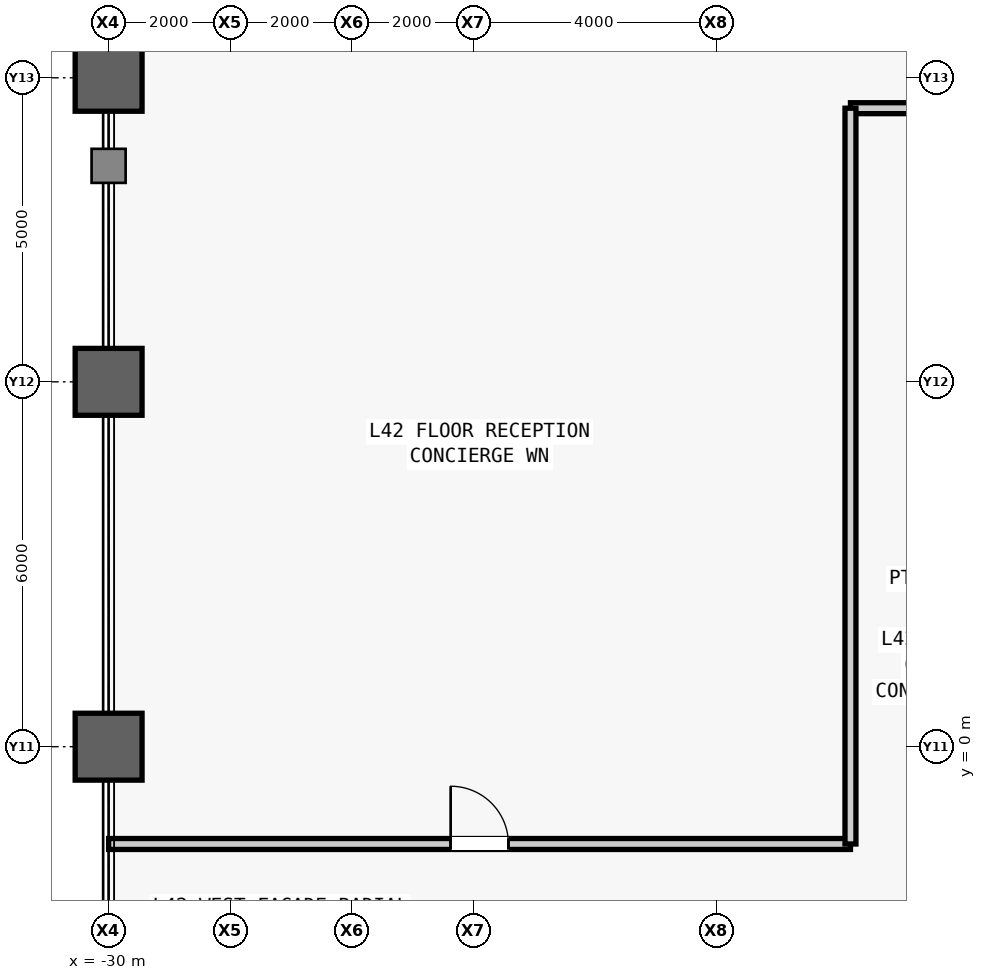
"""IFC4 building model, lengths in metres.
Left out: names, types, materials, properties, quantities, classifications, styles, units other than length and angle.
Written with IfcOpenShell. Run it as: python <this file> out.ifc"""

import sys

from ifc_helpers import new_model, si_unit, direction, frame, frame_2d, origin, origin_2d, place, context, subcontext, project, spatial, rectangle, hollow_rectangle, extrude, source, transform, mapped, element, fill, save


model = new_model("IFC4")
c1 = context("Model", 3, precision=1e-05, world=origin(), true_north=direction((0.0, 1.0)))
c2 = subcontext(c1, "Body", "Model", "MODEL_VIEW")
j1 = project(units=[si_unit("LENGTHUNIT", "METRE"), si_unit("PLANEANGLEUNIT", "RADIAN")], contexts=[c1])
p1 = place(None, origin())
s1 = spatial("IfcSite", under=j1, at=p1, CompositionType="ELEMENT")
p2 = place(p1, origin())
s2 = spatial("IfcBuilding", under=s1, at=p2, CompositionType="ELEMENT")
p3 = place(p2, frame((0.0, 0.0, 183.1)))
s3 = spatial("IfcBuildingStorey", under=s2, at=p3, CompositionType="ELEMENT", Elevation=183.1)
m1 = source(origin(), c2, "Body", "SweptSolid", [
    extrude(hollow_rectangle(XDim=1.1, YDim=1.1, WallThickness=0.06, at=origin_2d()), origin(), (0.0, 0.0, 1.0), 4.0),
])
for number, where, z_axis, x_axis in (
    (1, (-30.0, 0.0, 0.0), (0.0, 0.0, 1.0), (1.0, 0.0, 0.0)),
    (2, (-30.0, 6.0, 0.0), (0.0, 0.0, 1.0), (1.0, 0.0, 0.0)),
    (3, (-30.0, 11.0, 0.0), (0.0, 0.0, 1.0), (1.0, 0.0, 0.0)),
):
    element("IfcColumn", number, at=place(p3, frame(where, z_axis=z_axis, x_axis=x_axis)), inside=s3, PredefinedType="COLUMN", context=c2, shape_type="MappedRepresentation", body=[
        mapped(m1, transform((0.0, 0.0, 0.0), scale=1.0)),
    ])
m2 = source(origin(), c2, "Body", "SweptSolid", [
    extrude(rectangle(XDim=2.45, YDim=0.18, at=frame_2d((1.225, 0.0))), origin(), (0.0, 0.0, 1.0), 3.78),
])
p4 = place(p3, frame((-17.8, 10.5, 0.0), z_axis=(0.0, 0.0, 1.0), x_axis=(1.0, 0.0, 0.0)))
e4 = element("IfcWall", 4, at=p4, inside=s3, PredefinedType="PARTITIONING", context=c2, shape_type="MappedRepresentation", body=[
    mapped(m2, transform((0.0, 0.0, 0.0), scale=1.0)),
])
m3 = source(origin(), c2, "Body", "SweptSolid", [
    extrude(rectangle(XDim=12.2, YDim=0.18, at=frame_2d((6.1, 0.0))), origin(), (0.0, 0.0, 1.0), 3.78),
])
p5 = place(p3, frame((-30.0, -1.6, 0.0), z_axis=(0.0, 0.0, 1.0), x_axis=(1.0, 0.0, 0.0)))
e5 = element("IfcWall", 5, at=p5, inside=s3, PredefinedType="PARTITIONING", context=c2, shape_type="MappedRepresentation", body=[
    mapped(m3, transform((0.0, 0.0, 0.0), scale=1.0)),
])
m4 = source(origin(), c2, "Body", "SweptSolid", [
    extrude(rectangle(XDim=0.95, YDim=2.15, at=frame_2d((0.475, 1.075))), frame((0.0, 0.1, 0.0), z_axis=(0.0, -1.0, 0.0), x_axis=(1.0, 0.0, 0.0)), (0.0, 0.0, 1.0), 0.2),
])
p6 = place(p5, frame((5.625, 0.0, 0.0)))
e6 = element("IfcOpeningElement", 6, at=p6, cuts=e5, PredefinedType="OPENING", context=c2, shape_type="MappedRepresentation", body=[
    mapped(m4, transform((0.0, 0.0, 0.0), scale=1.0)),
])
m5 = source(origin(), c2, "Body", "SweptSolid", [
    extrude(rectangle(XDim=12.1, YDim=0.18, at=frame_2d((6.05, 0.0))), origin(), (0.0, 0.0, 1.0), 3.78),
])
p7 = place(p3, frame((-17.8, -1.6, 0.0), z_axis=(0.0, 0.0, 1.0), x_axis=(0.0, 1.0, 0.0)))
e7 = element("IfcWall", 7, at=p7, inside=s3, PredefinedType="PARTITIONING", context=c2, shape_type="MappedRepresentation", body=[
    mapped(m5, transform((0.0, 0.0, 0.0), scale=1.0)),
])
m6 = source(origin(), c2, "Body", "SweptSolid", [
    extrude(rectangle(XDim=0.95, YDim=2.15, at=frame_2d((0.475, 1.075))), frame((0.0, 0.025, 0.0), z_axis=(0.0, -1.0, 0.0), x_axis=(1.0, 0.0, 0.0)), (0.0, 0.0, 1.0), 0.05),
])
p8 = place(p6, origin())
e8 = element("IfcDoor", 8, at=p8, inside=s3, OperationType="SINGLE_SWING_LEFT", PredefinedType="DOOR", context=c2, shape_type="MappedRepresentation", body=[
    mapped(m6, transform((0.0, 0.0, 0.0), scale=1.0)),
])
fill(e6, e8)
save(model, sys.argv[1])
